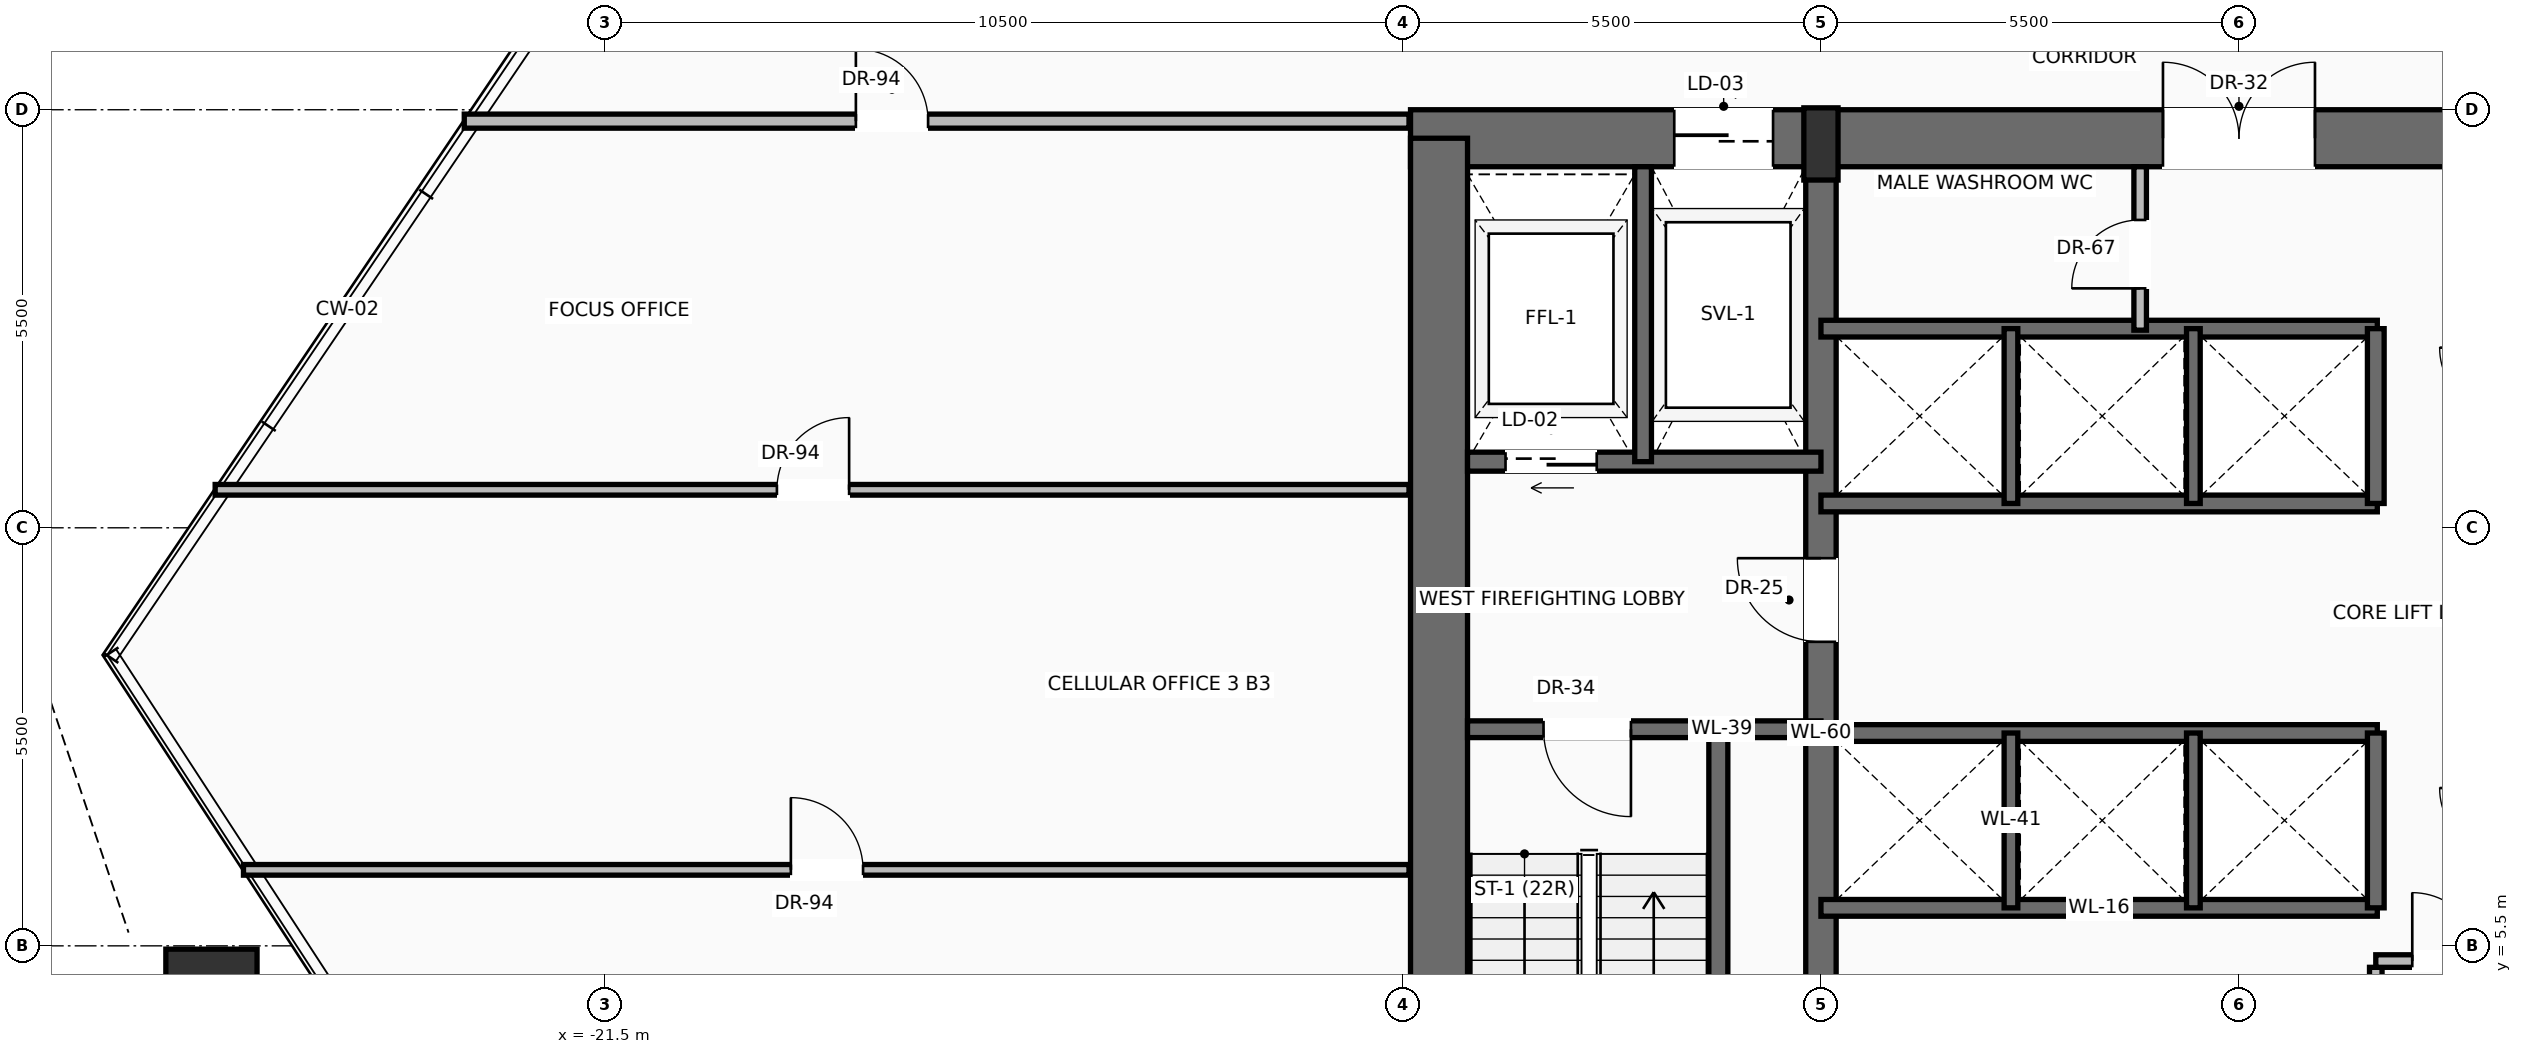
"""IFC4 building model, lengths in metres.
Left out: names, types, materials, properties, quantities, classifications, styles, units other than length and angle.
Written with IfcOpenShell. Run it as: python <this file> out.ifc"""

import sys

from ifc_helpers import new_model, si_unit, direction, frame, frame_2d, origin, origin_2d, place, context, subcontext, project, spatial, rectangle, hollow_rectangle, extrude, source, transform, mapped, element, fill, save


model = new_model("IFC4")
c1 = context("Model", 3, precision=1e-05, world=origin(), true_north=direction((0.0, 1.0)))
c2 = subcontext(c1, "Body", "Model", "MODEL_VIEW")
j1 = project(units=[si_unit("LENGTHUNIT", "METRE"), si_unit("PLANEANGLEUNIT", "RADIAN")], contexts=[c1])
p1 = place(None, origin())
s1 = spatial("IfcSite", under=j1, at=p1, CompositionType="ELEMENT")
p2 = place(p1, origin())
s2 = spatial("IfcBuilding", under=s1, at=p2, CompositionType="ELEMENT")
p3 = place(p2, frame((0.0, 0.0, 84.0)))
s3 = spatial("IfcBuildingStorey", under=s2, at=p3, CompositionType="ELEMENT", Elevation=84.0)
p4 = place(p3, frame((-10.9, 16.125, 0.0), z_axis=(0.0, 0.0, 1.0), x_axis=(1.0, 0.0, 0.0)))
e1 = element("IfcWall", 1, at=p4, inside=s3, PredefinedType="SHEAR", context=c2, shape_type="SweptSolid", body=[
    extrude(rectangle(XDim=21.8, YDim=0.75, at=frame_2d((10.9, 0.0))), origin(), (0.0, 0.0, 1.0), 3.45),
])
p5 = place(p4, frame((3.47, 0.0, 0.0)))
e2 = element("IfcOpeningElement", 2, at=p5, cuts=e1, PredefinedType="OPENING", context=c2, shape_type="SweptSolid", body=[
    extrude(rectangle(XDim=1.3, YDim=2.3, at=frame_2d((0.65, 1.15))), frame((0.0, 0.385, 0.0), z_axis=(0.0, -1.0, 0.0), x_axis=(1.0, 0.0, 0.0)), (0.0, 0.0, 1.0), 0.77),
])
p6 = place(p4, frame((9.9, 0.0, 0.0)))
e3 = element("IfcOpeningElement", 3, at=p6, cuts=e1, PredefinedType="OPENING", context=c2, shape_type="SweptSolid", body=[
    extrude(rectangle(XDim=2.0, YDim=2.4, at=frame_2d((1.0, 1.2))), frame((0.0, 0.385, 0.0), z_axis=(0.0, -1.0, 0.0), x_axis=(1.0, 0.0, 0.0)), (0.0, 0.0, 1.0), 0.77),
])
p7 = place(p3, frame((-10.525, 0.475, 0.0), z_axis=(0.0, 0.0, 1.0), x_axis=(0.0, 1.0, 0.0)))
e4 = element("IfcWall", 4, at=p7, inside=s3, PredefinedType="SHEAR", context=c2, shape_type="SweptSolid", body=[
    extrude(rectangle(XDim=15.65, YDim=0.75, at=frame_2d((7.825, 0.0))), origin(), (0.0, 0.0, 1.0), 3.45),
])
p8 = place(p3, frame((-5.5, 0.475, 0.0), z_axis=(0.0, 0.0, 1.0), x_axis=(0.0, 1.0, 0.0)))
e5 = element("IfcWall", 5, at=p8, inside=s3, PredefinedType="SHEAR", context=c2, shape_type="SweptSolid", body=[
    extrude(rectangle(XDim=15.65, YDim=0.4, at=frame_2d((7.825, 0.0))), origin(), (0.0, 0.0, 1.0), 3.45),
])
p9 = place(p8, frame((9.025, 0.0, 0.0)))
e6 = element("IfcOpeningElement", 6, at=p9, cuts=e5, PredefinedType="OPENING", context=c2, shape_type="SweptSolid", body=[
    extrude(rectangle(XDim=1.1, YDim=2.2, at=frame_2d((0.55, 1.1))), frame((0.0, 0.21, 0.0), z_axis=(0.0, -1.0, 0.0), x_axis=(1.0, 0.0, 0.0)), (0.0, 0.0, 1.0), 0.42),
])
m1 = source(origin(), c2, "Body", "SweptSolid", [
    extrude(rectangle(XDim=0.45, YDim=0.95, at=origin_2d()), origin(), (0.0, 0.0, 1.0), 3.7),
])
p10 = place(p3, frame((-5.5, 16.05, 0.0), z_axis=(0.0, 0.0, 1.0), x_axis=(1.0, 0.0, 0.0)))
e7 = element("IfcColumn", 7, at=p10, inside=s3, PredefinedType="PILASTER", context=c2, shape_type="MappedRepresentation", body=[
    mapped(m1, transform((0.0, 0.0, 0.0), scale=1.0)),
])
m2 = source(origin(), c2, "Body", "SweptSolid", [
    extrude(hollow_rectangle(XDim=1.2, YDim=1.2, WallThickness=0.06, at=origin_2d()), origin(), (0.0, 0.0, 1.0), 3.692),
])
p11 = place(p3, frame((-26.676, 4.856, 0.004), z_axis=(-0.002050099685, -0.01699598771, 0.999853456009), x_axis=(0.992803533881, -0.119754511869, 0.0)))
e8 = element("IfcColumn", 8, at=p11, inside=s3, PredefinedType="COLUMN", context=c2, shape_type="MappedRepresentation", body=[
    mapped(m2, transform((0.0, 0.0, 0.0), scale=1.0)),
])
p12 = place(p3, frame((-6.85, 0.85, 0.0), z_axis=(0.0, 0.0, 1.0), x_axis=(0.0, 1.0, 0.0)))
e9 = element("IfcWall", 9, at=p12, inside=s3, PredefinedType="SOLIDWALL", context=c2, shape_type="SweptSolid", body=[
    extrude(rectangle(XDim=7.5, YDim=0.25, at=frame_2d((3.75, 0.0))), origin(), (0.0, 0.0, 1.0), 3.45),
])
p13 = place(p3, frame((-5.5, 8.35, 0.0), z_axis=(0.0, 0.0, 1.0), x_axis=(-1.0, 0.0, 0.0)))
e10 = element("IfcWall", 10, at=p13, inside=s3, PredefinedType="SOLIDWALL", context=c2, shape_type="SweptSolid", body=[
    extrude(rectangle(XDim=4.65, YDim=0.22, at=frame_2d((2.325, 0.0))), origin(), (0.0, 0.0, 1.0), 3.45),
])
p14 = place(p13, frame((2.5, 0.0, 0.0)))
e11 = element("IfcOpeningElement", 11, at=p14, cuts=e10, PredefinedType="OPENING", context=c2, shape_type="SweptSolid", body=[
    extrude(rectangle(XDim=1.15, YDim=2.2, at=frame_2d((0.575, 1.1))), frame((0.0, 0.12, 0.0), z_axis=(0.0, -1.0, 0.0), x_axis=(1.0, 0.0, 0.0)), (0.0, 0.0, 1.0), 0.24),
])
p15 = place(p3, frame((-5.5, 11.87, 0.0), z_axis=(0.0, 0.0, 1.0), x_axis=(-1.0, 0.0, 0.0)))
e12 = element("IfcWall", 12, at=p15, inside=s3, PredefinedType="SOLIDWALL", context=c2, shape_type="SweptSolid", body=[
    extrude(rectangle(XDim=4.65, YDim=0.25, at=frame_2d((2.325, 0.0))), origin(), (0.0, 0.0, 1.0), 3.45),
])
p16 = place(p15, frame((2.95, 0.0, 0.0)))
e13 = element("IfcOpeningElement", 13, at=p16, cuts=e12, PredefinedType="OPENING", context=c2, shape_type="SweptSolid", body=[
    extrude(rectangle(XDim=1.2, YDim=2.25, at=frame_2d((0.6, 1.125))), frame((0.0, 0.135, 0.0), z_axis=(0.0, -1.0, 0.0), x_axis=(1.0, 0.0, 0.0)), (0.0, 0.0, 1.0), 0.27),
])
p17 = place(p3, frame((-7.84, 11.87, 0.0), z_axis=(0.0, 0.0, 1.0), x_axis=(0.0, 1.0, 0.0)))
e14 = element("IfcWall", 14, at=p17, inside=s3, PredefinedType="SOLIDWALL", context=c2, shape_type="SweptSolid", body=[
    extrude(rectangle(XDim=3.88, YDim=0.22, at=frame_2d((1.94, 0.0))), origin(), (0.0, 0.0, 1.0), 3.45),
])
p18 = place(p3, frame((1.8, 3.16, 0.0), z_axis=(0.0, 0.0, 1.0), x_axis=(0.0, 1.0, 0.0)))
e15 = element("IfcWall", 15, at=p18, inside=s3, PredefinedType="PARTITIONING", context=c2, shape_type="SweptSolid", body=[
    extrude(rectangle(XDim=2.058, YDim=0.165, at=frame_2d((1.029, 0.0))), origin(), (0.0, 0.0, 1.0), 3.442),
])
p19 = place(p3, frame((1.8, 5.3, 0.0), z_axis=(0.0, 0.0, 1.0), x_axis=(1.0, 0.0, 0.0)))
e16 = element("IfcWall", 16, at=p19, inside=s3, PredefinedType="PARTITIONING", context=c2, shape_type="SweptSolid", body=[
    extrude(rectangle(XDim=3.62, YDim=0.165, at=frame_2d((1.81, 0.0))), origin(), (0.0, 0.0, 1.0), 3.442),
])
p20 = place(p19, frame((0.48, 0.0, 0.0)))
e17 = element("IfcOpeningElement", 17, at=p20, cuts=e16, PredefinedType="OPENING", context=c2, shape_type="SweptSolid", body=[
    extrude(rectangle(XDim=0.9, YDim=2.1, at=frame_2d((0.45, 1.05))), frame((0.0, 0.093, 0.0), z_axis=(0.0, -1.0, 0.0), x_axis=(1.0, 0.0, 0.0)), (0.0, 0.0, 1.0), 0.185),
])
for number, where, z_axis, x_axis in (
    (18, (-5.5, 6.0, 0.0), (0.0, 0.0, 1.0), (1.0, 0.0, 0.0)),
    (19, (-5.5, 8.3, 0.0), (0.0, 0.0, 1.0), (1.0, 0.0, 0.0)),
):
    element("IfcWall", number, at=place(p3, frame(where, z_axis=z_axis, x_axis=x_axis)), inside=s3, PredefinedType="SOLIDWALL", context=c2, shape_type="SweptSolid", body=[
        extrude(rectangle(XDim=7.32, YDim=0.22, at=frame_2d((3.66, 0.0))), origin(), (0.0, 0.0, 1.0), 3.45),
    ])
p21 = place(p3, frame((1.8, 6.0, 0.0), z_axis=(0.0, 0.0, 1.0), x_axis=(0.0, 1.0, 0.0)))
e20 = element("IfcWall", 20, at=p21, inside=s3, PredefinedType="SOLIDWALL", context=c2, shape_type="SweptSolid", body=[
    extrude(rectangle(XDim=2.3, YDim=0.22, at=frame_2d((1.15, 0.0))), origin(), (0.0, 0.0, 1.0), 3.45),
])
for number, where, z_axis, x_axis in (
    (21, (-3.0, 6.0, 0.0), (0.0, 0.0, 1.0), (0.0, 1.0, 0.0)),
    (22, (-0.6, 6.0, 0.0), (0.0, 0.0, 1.0), (0.0, 1.0, 0.0)),
):
    element("IfcWall", number, at=place(p3, frame(where, z_axis=z_axis, x_axis=x_axis)), inside=s3, PredefinedType="SOLIDWALL", context=c2, shape_type="SweptSolid", body=[
        extrude(rectangle(XDim=2.3, YDim=0.18, at=frame_2d((1.15, 0.0))), origin(), (0.0, 0.0, 1.0), 3.45),
    ])
for number, where, z_axis, x_axis in (
    (23, (-5.5, 11.32, 0.0), (0.0, 0.0, 1.0), (1.0, 0.0, 0.0)),
    (24, (-5.5, 13.62, 0.0), (0.0, 0.0, 1.0), (1.0, 0.0, 0.0)),
):
    element("IfcWall", number, at=place(p3, frame(where, z_axis=z_axis, x_axis=x_axis)), inside=s3, PredefinedType="SOLIDWALL", context=c2, shape_type="SweptSolid", body=[
        extrude(rectangle(XDim=7.32, YDim=0.22, at=frame_2d((3.66, 0.0))), origin(), (0.0, 0.0, 1.0), 3.45),
    ])
p22 = place(p3, frame((1.8, 11.32, 0.0), z_axis=(0.0, 0.0, 1.0), x_axis=(0.0, 1.0, 0.0)))
e25 = element("IfcWall", 25, at=p22, inside=s3, PredefinedType="SOLIDWALL", context=c2, shape_type="SweptSolid", body=[
    extrude(rectangle(XDim=2.3, YDim=0.22, at=frame_2d((1.15, 0.0))), origin(), (0.0, 0.0, 1.0), 3.45),
])
for number, where, z_axis, x_axis in (
    (26, (-3.0, 11.32, 0.0), (0.0, 0.0, 1.0), (0.0, 1.0, 0.0)),
    (27, (-0.6, 11.32, 0.0), (0.0, 0.0, 1.0), (0.0, 1.0, 0.0)),
):
    element("IfcWall", number, at=place(p3, frame(where, z_axis=z_axis, x_axis=x_axis)), inside=s3, PredefinedType="SOLIDWALL", context=c2, shape_type="SweptSolid", body=[
        extrude(rectangle(XDim=2.3, YDim=0.18, at=frame_2d((1.15, 0.0))), origin(), (0.0, 0.0, 1.0), 3.45),
    ])
p23 = place(p3, frame((-1.3, 13.6, 0.0), z_axis=(0.0, 0.0, 1.0), x_axis=(0.0, 1.0, 0.0)))
e28 = element("IfcWall", 28, at=p23, inside=s3, PredefinedType="PARTITIONING", context=c2, shape_type="SweptSolid", body=[
    extrude(rectangle(XDim=2.15, YDim=0.165, at=frame_2d((1.075, 0.0))), origin(), (0.0, 0.0, 1.0), 3.442),
])
p24 = place(p23, frame((0.55, 0.0, 0.0)))
e29 = element("IfcOpeningElement", 29, at=p24, cuts=e28, PredefinedType="OPENING", context=c2, shape_type="SweptSolid", body=[
    extrude(rectangle(XDim=0.9, YDim=2.1, at=frame_2d((0.45, 1.05))), frame((0.0, 0.093, 0.0), z_axis=(0.0, -1.0, 0.0), x_axis=(1.0, 0.0, 0.0)), (0.0, 0.0, 1.0), 0.185),
])
p25 = place(p3, frame((-23.35, 16.35, 0.0), z_axis=(0.0, 0.0, 1.0), x_axis=(1.0, 0.0, 0.0)))
e30 = element("IfcWall", 30, at=p25, inside=s3, PredefinedType="PARTITIONING", context=c2, shape_type="SweptSolid", body=[
    extrude(rectangle(XDim=12.43, YDim=0.185, at=frame_2d((6.215, 0.0))), origin(), (0.0, 0.0, 1.0), 2.747),
])
p26 = place(p25, frame((5.153, 0.0, 0.0)))
e31 = element("IfcOpeningElement", 31, at=p26, cuts=e30, PredefinedType="OPENING", context=c2, shape_type="SweptSolid", body=[
    extrude(rectangle(XDim=0.95, YDim=2.2, at=frame_2d((0.475, 1.1))), frame((0.0, 0.103, 0.0), z_axis=(0.0, -1.0, 0.0), x_axis=(1.0, 0.0, 0.0)), (0.0, 0.0, 1.0), 0.205),
])
p27 = place(p3, frame((-26.255, 6.5, 0.0), z_axis=(0.0, 0.0, 1.0), x_axis=(1.0, 0.0, 0.0)))
e32 = element("IfcWall", 32, at=p27, inside=s3, PredefinedType="PARTITIONING", context=c2, shape_type="SweptSolid", body=[
    extrude(rectangle(XDim=15.335, YDim=0.14, at=frame_2d((7.667, 0.0))), origin(), (0.0, 0.0, 1.0), 3.442),
])
p28 = place(p27, frame((7.202, 0.0, 0.0)))
e33 = element("IfcOpeningElement", 33, at=p28, cuts=e32, PredefinedType="OPENING", context=c2, shape_type="SweptSolid", body=[
    extrude(rectangle(XDim=0.95, YDim=2.2, at=frame_2d((0.475, 1.1))), frame((0.0, 0.08, 0.0), z_axis=(0.0, -1.0, 0.0), x_axis=(1.0, 0.0, 0.0)), (0.0, 0.0, 1.0), 0.16),
])
p29 = place(p3, frame((-26.627, 11.5, 0.0), z_axis=(0.0, 0.0, 1.0), x_axis=(1.0, 0.0, 0.0)))
e34 = element("IfcWall", 34, at=p29, inside=s3, PredefinedType="PARTITIONING", context=c2, shape_type="SweptSolid", body=[
    extrude(rectangle(XDim=15.708, YDim=0.14, at=frame_2d((7.854, 0.0))), origin(), (0.0, 0.0, 1.0), 3.442),
])
p30 = place(p29, frame((7.391, 0.0, 0.0)))
e35 = element("IfcOpeningElement", 35, at=p30, cuts=e34, PredefinedType="OPENING", context=c2, shape_type="SweptSolid", body=[
    extrude(rectangle(XDim=0.95, YDim=2.2, at=frame_2d((0.475, 1.1))), frame((0.0, 0.08, 0.0), z_axis=(0.0, -1.0, 0.0), x_axis=(1.0, 0.0, 0.0)), (0.0, 0.0, 1.0), 0.16),
])
m3 = source(origin(), c2, "Body", "SweptSolid", [
    extrude(rectangle(XDim=1.15, YDim=2.2, at=frame_2d((0.575, 1.1))), frame((0.0, 0.025, 0.0), z_axis=(0.0, -1.0, 0.0), x_axis=(1.0, 0.0, 0.0)), (0.0, 0.0, 1.0), 0.05),
])
p31 = place(p14, origin())
e36 = element("IfcDoor", 36, at=p31, inside=s3, OperationType="SINGLE_SWING_LEFT", PredefinedType="DOOR", context=c2, shape_type="MappedRepresentation", body=[
    mapped(m3, transform((0.0, 0.0, 0.0), scale=1.0)),
])
fill(e11, e36)
m4 = source(origin(), c2, "Body", "SweptSolid", [
    extrude(rectangle(XDim=1.1, YDim=2.2, at=frame_2d((0.55, 1.1))), frame((0.0, 0.025, 0.0), z_axis=(0.0, -1.0, 0.0), x_axis=(1.0, 0.0, 0.0)), (0.0, 0.0, 1.0), 0.05),
])
p32 = place(p9, origin())
e37 = element("IfcDoor", 37, at=p32, inside=s3, OperationType="SINGLE_SWING_RIGHT", PredefinedType="DOOR", context=c2, shape_type="MappedRepresentation", body=[
    mapped(m4, transform((0.0, 0.0, 0.0), scale=1.0)),
])
fill(e6, e37)
m5 = source(origin(), c2, "Body", "SweptSolid", [
    extrude(rectangle(XDim=1.2, YDim=2.25, at=frame_2d((0.6, 1.125))), frame((0.0, 0.025, 0.0), z_axis=(0.0, -1.0, 0.0), x_axis=(1.0, 0.0, 0.0)), (0.0, 0.0, 1.0), 0.05),
])
p33 = place(p16, origin())
e38 = element("IfcDoor", 38, at=p33, inside=s3, OperationType="SLIDING_TO_LEFT", PredefinedType="DOOR", context=c2, shape_type="MappedRepresentation", body=[
    mapped(m5, transform((0.0, 0.0, 0.0), scale=1.0)),
])
fill(e13, e38)
m6 = source(origin(), c2, "Body", "SweptSolid", [
    extrude(rectangle(XDim=1.3, YDim=2.3, at=frame_2d((0.65, 1.15))), frame((0.0, 0.025, 0.0), z_axis=(0.0, -1.0, 0.0), x_axis=(1.0, 0.0, 0.0)), (0.0, 0.0, 1.0), 0.05),
])
p34 = place(p5, origin())
e39 = element("IfcDoor", 39, at=p34, inside=s3, OperationType="SLIDING_TO_RIGHT", PredefinedType="DOOR", context=c2, shape_type="MappedRepresentation", body=[
    mapped(m6, transform((0.0, 0.0, 0.0), scale=1.0)),
])
fill(e2, e39)
m7 = source(origin(), c2, "Body", "SweptSolid", [
    extrude(rectangle(XDim=2.0, YDim=2.4, at=frame_2d((1.0, 1.2))), frame((0.0, 0.025, 0.0), z_axis=(0.0, -1.0, 0.0), x_axis=(1.0, 0.0, 0.0)), (0.0, 0.0, 1.0), 0.05),
])
p35 = place(p6, origin())
e40 = element("IfcDoor", 40, at=p35, inside=s3, OperationType="DOUBLE_DOOR_SINGLE_SWING", PredefinedType="DOOR", context=c2, shape_type="MappedRepresentation", body=[
    mapped(m7, transform((0.0, 0.0, 0.0), scale=1.0)),
])
fill(e3, e40)
m8 = source(origin(), c2, "Body", "SweptSolid", [
    extrude(rectangle(XDim=0.9, YDim=2.1, at=frame_2d((0.45, 1.05))), frame((0.0, 0.025, 0.0), z_axis=(0.0, -1.0, 0.0), x_axis=(1.0, 0.0, 0.0)), (0.0, 0.0, 1.0), 0.05),
])
p36 = place(p20, origin())
e41 = element("IfcDoor", 41, at=p36, inside=s3, OperationType="SINGLE_SWING_LEFT", PredefinedType="DOOR", context=c2, shape_type="MappedRepresentation", body=[
    mapped(m8, transform((0.0, 0.0, 0.0), scale=1.0)),
])
fill(e17, e41)
p37 = place(p24, origin())
e42 = element("IfcDoor", 42, at=p37, inside=s3, OperationType="SINGLE_SWING_LEFT", PredefinedType="DOOR", context=c2, shape_type="MappedRepresentation", body=[
    mapped(m8, transform((0.0, 0.0, 0.0), scale=1.0)),
])
fill(e29, e42)
m9 = source(origin(), c2, "Body", "SweptSolid", [
    extrude(rectangle(XDim=0.95, YDim=2.2, at=frame_2d((0.475, 1.1))), frame((0.0, 0.025, 0.0), z_axis=(0.0, -1.0, 0.0), x_axis=(1.0, 0.0, 0.0)), (0.0, 0.0, 1.0), 0.05),
])
p38 = place(p26, origin())
e43 = element("IfcDoor", 43, at=p38, inside=s3, OperationType="SINGLE_SWING_LEFT", PredefinedType="DOOR", context=c2, shape_type="MappedRepresentation", body=[
    mapped(m9, transform((0.0, 0.0, 0.0), scale=1.0)),
])
fill(e31, e43)
p39 = place(p30, origin())
e44 = element("IfcDoor", 44, at=p39, inside=s3, OperationType="SINGLE_SWING_RIGHT", PredefinedType="DOOR", context=c2, shape_type="MappedRepresentation", body=[
    mapped(m9, transform((0.0, 0.0, 0.0), scale=1.0)),
])
fill(e35, e44)
p40 = place(p28, origin())
e45 = element("IfcDoor", 45, at=p40, inside=s3, OperationType="SINGLE_SWING_LEFT", PredefinedType="DOOR", context=c2, shape_type="MappedRepresentation", body=[
    mapped(m9, transform((0.0, 0.0, 0.0), scale=1.0)),
])
fill(e33, e45)
save(model, sys.argv[1])
